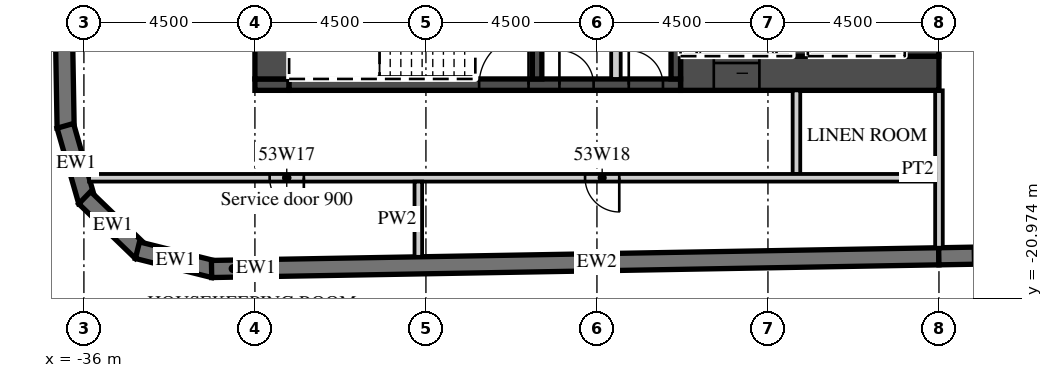
"""IFC4 building model, lengths in metres.
Left out: names, types, materials, properties, quantities, classifications, styles, units other than length and angle.
Written with IfcOpenShell. Run it as: python <this file> out.ifc"""

import sys

from ifc_helpers import new_model, si_unit, direction, frame, frame_2d, origin, place, context, subcontext, project, spatial, polyline, rectangle, outline, extrude, element, fill, save


model = new_model("IFC4")
c1 = context("Model", 3, precision=1e-05, world=origin(), true_north=direction((0.0, 1.0)))
c2 = subcontext(c1, "Body", "Model", "MODEL_VIEW")
j1 = project(units=[si_unit("LENGTHUNIT", "METRE"), si_unit("PLANEANGLEUNIT", "RADIAN")], contexts=[c1])
p1 = place(None, origin())
s1 = spatial("IfcSite", under=j1, at=p1, CompositionType="ELEMENT")
p2 = place(p1, origin())
s2 = spatial("IfcBuilding", under=s1, at=p2, CompositionType="ELEMENT")
p3 = place(p2, frame((0.0, 0.0, 221.0)))
s3 = spatial("IfcBuildingStorey", under=s2, at=p3, CompositionType="ELEMENT", Elevation=221.0)
p4 = place(p3, frame((-37.057, 16.503, 0.0), z_axis=(0.0, 0.0, 1.0), x_axis=(0.017452279857, -0.999847697366, 0.0)))
e1 = element("IfcWall", 1, at=p4, inside=s3, PredefinedType="SOLIDWALL", context=c2, shape_type="SweptSolid", body=[
    extrude(rectangle(XDim=33.0, YDim=0.45, at=frame_2d((16.5, 0.0))), origin(), (0.0, 0.0, 1.0), 3.02),
])
p5 = place(p3, frame((-36.49, -16.434, 0.0), z_axis=(0.0, 0.0, 1.0), x_axis=(0.275577603096, -0.961278827745, 0.0)))
e2 = element("IfcWall", 2, at=p5, inside=s3, PredefinedType="SOLIDWALL", context=c2, shape_type="SweptSolid", body=[
    extrude(outline(polyline([(0.0, -0.225), (2.071, -0.225), (1.95, 0.225), (0.121, 0.225), (0.0, -0.225)])), origin(), (0.0, 0.0, 1.0), 3.02),
])
p6 = place(p3, frame((-35.979, -18.324, 0.0), z_axis=(0.0, 0.0, 1.0), x_axis=(0.719320193998, -0.694678672846, 0.0)))
e3 = element("IfcWall", 3, at=p6, inside=s3, PredefinedType="SOLIDWALL", context=c2, shape_type="SweptSolid", body=[
    extrude(outline(polyline([(0.0, -0.225), (2.071, -0.225), (1.95, 0.225), (0.121, 0.225), (0.0, -0.225)])), origin(), (0.0, 0.0, 1.0), 3.02),
])
p7 = place(p3, frame((-34.591, -19.706, 0.0), z_axis=(0.0, 0.0, 1.0), x_axis=(0.970315655375, -0.241841950319, 0.0)))
e4 = element("IfcWall", 4, at=p7, inside=s3, PredefinedType="SOLIDWALL", context=c2, shape_type="SweptSolid", body=[
    extrude(outline(polyline([(0.0, -0.225), (2.071, -0.225), (1.95, 0.225), (0.121, 0.225), (0.0, -0.225)])), origin(), (0.0, 0.0, 1.0), 3.02),
])
p8 = place(p3, frame((-32.641, -20.2, 0.0), z_axis=(0.0, 0.0, 1.0), x_axis=(0.99984870815, 0.017394275206, 0.0)))
e5 = element("IfcWall", 5, at=p8, inside=s3, PredefinedType="SOLIDWALL", context=c2, shape_type="SweptSolid", body=[
    extrude(rectangle(XDim=1.137, YDim=0.45, at=frame_2d((0.568, 0.0))), origin(), (0.0, 0.0, 1.0), 3.02),
])
p9 = place(p3, frame((-31.504, -20.18, 0.0), z_axis=(0.0, 0.0, 1.0), x_axis=(0.999847677887, 0.017453395744, 0.0)))
e6 = element("IfcWall", 6, at=p9, inside=s3, PredefinedType="SOLIDWALL", context=c2, shape_type="SweptSolid", body=[
    extrude(rectangle(XDim=18.003, YDim=0.45, at=frame_2d((9.001, 0.0))), origin(), (0.0, 0.0, 1.0), 3.02),
])
p10 = place(p3, frame((-13.504, -19.866, 0.0), z_axis=(0.0, 0.0, 1.0), x_axis=(0.999847672978, 0.017453676992, 0.0)))
e7 = element("IfcWall", 7, at=p10, inside=s3, PredefinedType="SOLIDWALL", context=c2, shape_type="SweptSolid", body=[
    extrude(rectangle(XDim=52.86, YDim=0.45, at=frame_2d((26.43, 0.0))), origin(), (0.0, 0.0, 1.0), 3.02),
])
p11 = place(p10, frame((0.9, 0.0, 0.45)))
e8 = element("IfcOpeningElement", 8, at=p11, cuts=e7, PredefinedType="OPENING", context=c2, shape_type="SweptSolid", body=[
    extrude(rectangle(XDim=2.7, YDim=2.25, at=frame_2d((1.35, 1.125))), frame((0.0, 0.235, 0.0), z_axis=(0.0, -1.0, 0.0), x_axis=(1.0, 0.0, 0.0)), (0.0, 0.0, 1.0), 0.47),
])
p12 = place(p10, frame((5.401, 0.0, 0.45)))
e9 = element("IfcOpeningElement", 9, at=p12, cuts=e7, PredefinedType="OPENING", context=c2, shape_type="SweptSolid", body=[
    extrude(rectangle(XDim=2.7, YDim=2.25, at=frame_2d((1.35, 1.125))), frame((0.0, 0.235, 0.0), z_axis=(0.0, -1.0, 0.0), x_axis=(1.0, 0.0, 0.0)), (0.0, 0.0, 1.0), 0.47),
])
p13 = place(p10, frame((9.902, 0.0, 0.45)))
e10 = element("IfcOpeningElement", 10, at=p13, cuts=e7, PredefinedType="OPENING", context=c2, shape_type="SweptSolid", body=[
    extrude(rectangle(XDim=2.7, YDim=2.25, at=frame_2d((1.35, 1.125))), frame((0.0, 0.235, 0.0), z_axis=(0.0, -1.0, 0.0), x_axis=(1.0, 0.0, 0.0)), (0.0, 0.0, 1.0), 0.47),
])
p14 = place(p10, frame((14.402, 0.0, 0.45)))
e11 = element("IfcOpeningElement", 11, at=p14, cuts=e7, PredefinedType="OPENING", context=c2, shape_type="SweptSolid", body=[
    extrude(rectangle(XDim=2.7, YDim=2.25, at=frame_2d((1.35, 1.125))), frame((0.0, 0.235, 0.0), z_axis=(0.0, -1.0, 0.0), x_axis=(1.0, 0.0, 0.0)), (0.0, 0.0, 1.0), 0.47),
])
p15 = place(p10, frame((18.903, 0.0, 0.45)))
e12 = element("IfcOpeningElement", 12, at=p15, cuts=e7, PredefinedType="OPENING", context=c2, shape_type="SweptSolid", body=[
    extrude(rectangle(XDim=2.7, YDim=2.25, at=frame_2d((1.35, 1.125))), frame((0.0, 0.235, 0.0), z_axis=(0.0, -1.0, 0.0), x_axis=(1.0, 0.0, 0.0)), (0.0, 0.0, 1.0), 0.47),
])
p16 = place(p10, frame((23.404, 0.0, 0.45)))
e13 = element("IfcOpeningElement", 13, at=p16, cuts=e7, PredefinedType="OPENING", context=c2, shape_type="SweptSolid", body=[
    extrude(rectangle(XDim=2.7, YDim=2.25, at=frame_2d((1.35, 1.125))), frame((0.0, 0.235, 0.0), z_axis=(0.0, -1.0, 0.0), x_axis=(1.0, 0.0, 0.0)), (0.0, 0.0, 1.0), 0.47),
])
p17 = place(p10, frame((27.904, 0.0, 0.45)))
e14 = element("IfcOpeningElement", 14, at=p17, cuts=e7, PredefinedType="OPENING", context=c2, shape_type="SweptSolid", body=[
    extrude(rectangle(XDim=2.7, YDim=2.25, at=frame_2d((1.35, 1.125))), frame((0.0, 0.235, 0.0), z_axis=(0.0, -1.0, 0.0), x_axis=(1.0, 0.0, 0.0)), (0.0, 0.0, 1.0), 0.47),
])
p18 = place(p10, frame((32.405, 0.0, 0.45)))
e15 = element("IfcOpeningElement", 15, at=p18, cuts=e7, PredefinedType="OPENING", context=c2, shape_type="SweptSolid", body=[
    extrude(rectangle(XDim=2.7, YDim=2.25, at=frame_2d((1.35, 1.125))), frame((0.0, 0.235, 0.0), z_axis=(0.0, -1.0, 0.0), x_axis=(1.0, 0.0, 0.0)), (0.0, 0.0, 1.0), 0.47),
])
p19 = place(p10, frame((36.906, 0.0, 0.45)))
e16 = element("IfcOpeningElement", 16, at=p19, cuts=e7, PredefinedType="OPENING", context=c2, shape_type="SweptSolid", body=[
    extrude(rectangle(XDim=2.7, YDim=2.25, at=frame_2d((1.35, 1.125))), frame((0.0, 0.235, 0.0), z_axis=(0.0, -1.0, 0.0), x_axis=(1.0, 0.0, 0.0)), (0.0, 0.0, 1.0), 0.47),
])
p20 = place(p10, frame((41.406, 0.0, 0.45)))
e17 = element("IfcOpeningElement", 17, at=p20, cuts=e7, PredefinedType="OPENING", context=c2, shape_type="SweptSolid", body=[
    extrude(rectangle(XDim=2.7, YDim=2.25, at=frame_2d((1.35, 1.125))), frame((0.0, 0.235, 0.0), z_axis=(0.0, -1.0, 0.0), x_axis=(1.0, 0.0, 0.0)), (0.0, 0.0, 1.0), 0.47),
])
p21 = place(p10, frame((45.907, 0.0, 0.45)))
e18 = element("IfcOpeningElement", 18, at=p21, cuts=e7, PredefinedType="OPENING", context=c2, shape_type="SweptSolid", body=[
    extrude(rectangle(XDim=2.7, YDim=2.25, at=frame_2d((1.35, 1.125))), frame((0.0, 0.235, 0.0), z_axis=(0.0, -1.0, 0.0), x_axis=(1.0, 0.0, 0.0)), (0.0, 0.0, 1.0), 0.47),
])
p22 = place(p3, frame((-13.5, -19.641, 0.0), z_axis=(0.0, 0.0, 1.0), x_axis=(0.0, 1.0, 0.0)))
e19 = element("IfcWall", 19, at=p22, inside=s3, PredefinedType="PARTITIONING", context=c2, shape_type="SweptSolid", body=[
    extrude(rectangle(XDim=4.141, YDim=0.2, at=frame_2d((2.071, 0.0))), origin(), (0.0, 0.0, 1.0), 3.02),
])
p23 = place(p3, frame((-20.3, -15.05, 0.0), z_axis=(0.0, 0.0, 1.0), x_axis=(1.0, 0.0, 0.0)))
e20 = element("IfcWall", 20, at=p23, inside=s3, PredefinedType="SHEAR", context=c2, shape_type="SweptSolid", body=[
    extrude(rectangle(XDim=6.8, YDim=0.9, at=frame_2d((3.4, 0.0))), origin(), (0.0, 0.0, 1.0), 3.02),
])
p24 = place(p23, frame((0.875, 0.0, 0.0)))
e21 = element("IfcOpeningElement", 21, at=p24, cuts=e20, PredefinedType="OPENING", context=c2, shape_type="SweptSolid", body=[
    extrude(rectangle(XDim=1.2, YDim=2.1, at=frame_2d((0.6, 1.05))), frame((0.0, 0.46, 0.0), z_axis=(0.0, -1.0, 0.0), x_axis=(1.0, 0.0, 0.0)), (0.0, 0.0, 1.0), 0.92),
])
p25 = place(p3, frame((-31.5, -15.35, 0.0), z_axis=(0.0, 0.0, 1.0), x_axis=(1.0, 0.0, 0.0)))
e22 = element("IfcWall", 22, at=p25, inside=s3, PredefinedType="SHEAR", context=c2, shape_type="SweptSolid", body=[
    extrude(rectangle(XDim=0.9, YDim=0.3, at=frame_2d((0.45, 0.0))), origin(), (0.0, 0.0, 1.0), 3.02),
])
p26 = place(p3, frame((-30.6, -15.35, 0.0), z_axis=(0.0, 0.0, 1.0), x_axis=(1.0, 0.0, 0.0)))
e23 = element("IfcWall", 23, at=p26, inside=s3, PredefinedType="SHEAR", context=c2, shape_type="SweptSolid", body=[
    extrude(rectangle(XDim=10.3, YDim=0.3, at=frame_2d((5.15, 0.0))), origin(), (0.0, 0.0, 1.0), 3.02),
])
p27 = place(p26, frame((5.0, 0.0, 0.0)))
e24 = element("IfcOpeningElement", 24, at=p27, cuts=e23, PredefinedType="OPENING", context=c2, shape_type="SweptSolid", body=[
    extrude(rectangle(XDim=1.3, YDim=2.1, at=frame_2d((0.65, 1.05))), frame((0.0, 0.16, 0.0), z_axis=(0.0, -1.0, 0.0), x_axis=(1.0, 0.0, 0.0)), (0.0, 0.0, 1.0), 0.32),
])
p28 = place(p26, frame((7.113, 0.0, 0.0)))
e25 = element("IfcOpeningElement", 25, at=p28, cuts=e23, PredefinedType="OPENING", context=c2, shape_type="SweptSolid", body=[
    extrude(rectangle(XDim=0.9, YDim=2.1, at=frame_2d((0.45, 1.05))), frame((0.0, 0.16, 0.0), z_axis=(0.0, -1.0, 0.0), x_axis=(1.0, 0.0, 0.0)), (0.0, 0.0, 1.0), 0.32),
])
p29 = place(p26, frame((8.938, 0.0, 0.0)))
e26 = element("IfcOpeningElement", 26, at=p29, cuts=e23, PredefinedType="OPENING", context=c2, shape_type="SweptSolid", body=[
    extrude(rectangle(XDim=0.9, YDim=2.1, at=frame_2d((0.45, 1.05))), frame((0.0, 0.16, 0.0), z_axis=(0.0, -1.0, 0.0), x_axis=(1.0, 0.0, 0.0)), (0.0, 0.0, 1.0), 0.32),
])
p30 = place(p3, frame((-31.05, -15.2, 0.0), z_axis=(0.0, 0.0, 1.0), x_axis=(0.0, 1.0, 0.0)))
e27 = element("IfcWall", 27, at=p30, inside=s3, PredefinedType="SHEAR", context=c2, shape_type="SweptSolid", body=[
    extrude(rectangle(XDim=12.8, YDim=0.9, at=frame_2d((6.4, 0.0))), origin(), (0.0, 0.0, 1.0), 3.02),
])
p31 = place(p30, frame((11.5, 0.0, 0.0)))
e28 = element("IfcOpeningElement", 28, at=p31, cuts=e27, PredefinedType="OPENING", context=c2, shape_type="SweptSolid", body=[
    extrude(rectangle(XDim=1.1, YDim=2.1, at=frame_2d((0.55, 1.05))), frame((0.0, 0.46, 0.0), z_axis=(0.0, -1.0, 0.0), x_axis=(1.0, 0.0, 0.0)), (0.0, 0.0, 1.0), 0.92),
])
p32 = place(p3, frame((-13.95, -14.6, 0.0), z_axis=(0.0, 0.0, 1.0), x_axis=(0.0, 1.0, 0.0)))
e29 = element("IfcWall", 29, at=p32, inside=s3, PredefinedType="SHEAR", context=c2, shape_type="SweptSolid", body=[
    extrude(rectangle(XDim=12.2, YDim=0.9, at=frame_2d((6.1, 0.0))), origin(), (0.0, 0.0, 1.0), 3.02),
])
p33 = place(p3, frame((-17.15, -14.6, 0.0), z_axis=(0.0, 0.0, 1.0), x_axis=(0.0, 1.0, 0.0)))
e30 = element("IfcWall", 30, at=p33, inside=s3, PredefinedType="SHEAR", context=c2, shape_type="SweptSolid", body=[
    extrude(rectangle(XDim=5.8, YDim=0.4, at=frame_2d((2.9, 0.0))), origin(), (0.0, 0.0, 1.0), 3.02),
])
for number, where, z_axis, x_axis in (
    (31, (-20.425, -15.2, 0.0), (0.0, 0.0, 1.0), (0.0, 1.0, 0.0)),
    (32, (-24.075, -15.2, 0.0), (0.0, 0.0, 1.0), (0.0, 1.0, 0.0)),
):
    element("IfcWall", number, at=place(p3, frame(where, z_axis=z_axis, x_axis=x_axis)), inside=s3, PredefinedType="SHEAR", context=c2, shape_type="SweptSolid", body=[
        extrude(rectangle(XDim=3.25, YDim=0.25, at=frame_2d((1.625, 0.0))), origin(), (0.0, 0.0, 1.0), 3.02),
    ])
p34 = place(p3, frame((-22.0, -15.2, 0.0), z_axis=(0.0, 0.0, 1.0), x_axis=(0.0, 1.0, 0.0)))
e33 = element("IfcWall", 33, at=p34, inside=s3, PredefinedType="PARTITIONING", context=c2, shape_type="SweptSolid", body=[
    extrude(rectangle(XDim=3.25, YDim=0.25, at=frame_2d((1.625, 0.0))), origin(), (0.0, 0.0, 1.0), 3.02),
])
p35 = place(p3, frame((-17.25, -17.7, 0.0), z_axis=(0.0, 0.0, 1.0), x_axis=(0.0, 1.0, 0.0)))
e34 = element("IfcWall", 34, at=p35, inside=s3, PredefinedType="PARTITIONING", context=c2, shape_type="SweptSolid", body=[
    extrude(rectangle(XDim=2.2, YDim=0.2, at=frame_2d((1.1, 0.0))), origin(), (0.0, 0.0, 1.0), 3.02),
])
p36 = place(p3, frame((-35.864, -17.8, 0.0), z_axis=(0.0, 0.0, 1.0), x_axis=(1.0, 0.0, 0.0)))
e35 = element("IfcWall", 35, at=p36, inside=s3, PredefinedType="PARTITIONING", context=c2, shape_type="SweptSolid", body=[
    extrude(rectangle(XDim=22.264, YDim=0.2, at=frame_2d((11.132, 0.0))), origin(), (0.0, 0.0, 1.0), 3.02),
])
p37 = place(p36, frame((4.751, 0.0, 0.0)))
e36 = element("IfcOpeningElement", 36, at=p37, cuts=e35, PredefinedType="OPENING", context=c2, shape_type="SweptSolid", body=[
    extrude(rectangle(XDim=0.9, YDim=2.1, at=frame_2d((0.45, 1.05))), frame((0.0, 0.11, 0.0), z_axis=(0.0, -1.0, 0.0), x_axis=(1.0, 0.0, 0.0)), (0.0, 0.0, 1.0), 0.22),
])
p38 = place(p36, frame((13.051, 0.0, 0.0)))
e37 = element("IfcOpeningElement", 37, at=p38, cuts=e35, PredefinedType="OPENING", context=c2, shape_type="SweptSolid", body=[
    extrude(rectangle(XDim=0.9, YDim=2.1, at=frame_2d((0.45, 1.05))), frame((0.0, 0.11, 0.0), z_axis=(0.0, -1.0, 0.0), x_axis=(1.0, 0.0, 0.0)), (0.0, 0.0, 1.0), 0.22),
])
p39 = place(p3, frame((-27.2, -19.88, 0.0), z_axis=(0.0, 0.0, 1.0), x_axis=(0.0, 1.0, 0.0)))
e38 = element("IfcWall", 38, at=p39, inside=s3, PredefinedType="PARTITIONING", context=c2, shape_type="SweptSolid", body=[
    extrude(rectangle(XDim=1.98, YDim=0.2, at=frame_2d((0.99, 0.0))), origin(), (0.0, 0.0, 1.0), 3.02),
])
p40 = place(p11, origin())
e39 = element("IfcWindow", 39, at=p40, inside=s3, PartitioningType="SINGLE_PANEL", PredefinedType="WINDOW", context=c2, shape_type="SweptSolid", body=[
    extrude(rectangle(XDim=2.7, YDim=2.25, at=frame_2d((1.35, 1.125))), frame((0.0, 0.09, 0.0), z_axis=(0.0, -1.0, 0.0), x_axis=(1.0, 0.0, 0.0)), (0.0, 0.0, 1.0), 0.06),
])
fill(e8, e39)
p41 = place(p24, origin())
e40 = element("IfcDoor", 40, at=p41, inside=s3, OperationType="SLIDING_TO_LEFT", PredefinedType="DOOR", context=c2, shape_type="SweptSolid", body=[
    extrude(rectangle(XDim=1.2, YDim=2.1, at=frame_2d((0.6, 1.05))), frame((0.0, 0.025, 0.0), z_axis=(0.0, -1.0, 0.0), x_axis=(1.0, 0.0, 0.0)), (0.0, 0.0, 1.0), 0.05),
])
fill(e21, e40)
p42 = place(p27, origin())
e41 = element("IfcDoor", 41, at=p42, inside=s3, OperationType="SINGLE_SWING_RIGHT", PredefinedType="DOOR", context=c2, shape_type="SweptSolid", body=[
    extrude(rectangle(XDim=1.3, YDim=2.1, at=frame_2d((0.65, 1.05))), frame((0.0, 0.025, 0.0), z_axis=(0.0, -1.0, 0.0), x_axis=(1.0, 0.0, 0.0)), (0.0, 0.0, 1.0), 0.05),
])
fill(e24, e41)
p43 = place(p28, origin())
e42 = element("IfcDoor", 42, at=p43, inside=s3, OperationType="SINGLE_SWING_LEFT", PredefinedType="DOOR", context=c2, shape_type="SweptSolid", body=[
    extrude(rectangle(XDim=0.9, YDim=2.1, at=frame_2d((0.45, 1.05))), frame((0.0, 0.025, 0.0), z_axis=(0.0, -1.0, 0.0), x_axis=(1.0, 0.0, 0.0)), (0.0, 0.0, 1.0), 0.05),
])
fill(e25, e42)
p44 = place(p29, origin())
e43 = element("IfcDoor", 43, at=p44, inside=s3, OperationType="SINGLE_SWING_LEFT", PredefinedType="DOOR", context=c2, shape_type="SweptSolid", body=[
    extrude(rectangle(XDim=0.9, YDim=2.1, at=frame_2d((0.45, 1.05))), frame((0.0, 0.025, 0.0), z_axis=(0.0, -1.0, 0.0), x_axis=(1.0, 0.0, 0.0)), (0.0, 0.0, 1.0), 0.05),
])
fill(e26, e43)
p45 = place(p37, origin())
e44 = element("IfcDoor", 44, at=p45, inside=s3, OperationType="SINGLE_SWING_RIGHT", PredefinedType="DOOR", context=c2, shape_type="SweptSolid", body=[
    extrude(rectangle(XDim=0.9, YDim=2.1, at=frame_2d((0.45, 1.05))), frame((0.0, 0.025, 0.0), z_axis=(0.0, -1.0, 0.0), x_axis=(1.0, 0.0, 0.0)), (0.0, 0.0, 1.0), 0.05),
])
fill(e36, e44)
p46 = place(p38, origin())
e45 = element("IfcDoor", 45, at=p46, inside=s3, OperationType="SINGLE_SWING_RIGHT", PredefinedType="DOOR", context=c2, shape_type="SweptSolid", body=[
    extrude(rectangle(XDim=0.9, YDim=2.1, at=frame_2d((0.45, 1.05))), frame((0.0, 0.025, 0.0), z_axis=(0.0, -1.0, 0.0), x_axis=(1.0, 0.0, 0.0)), (0.0, 0.0, 1.0), 0.05),
])
fill(e37, e45)
save(model, sys.argv[1])
